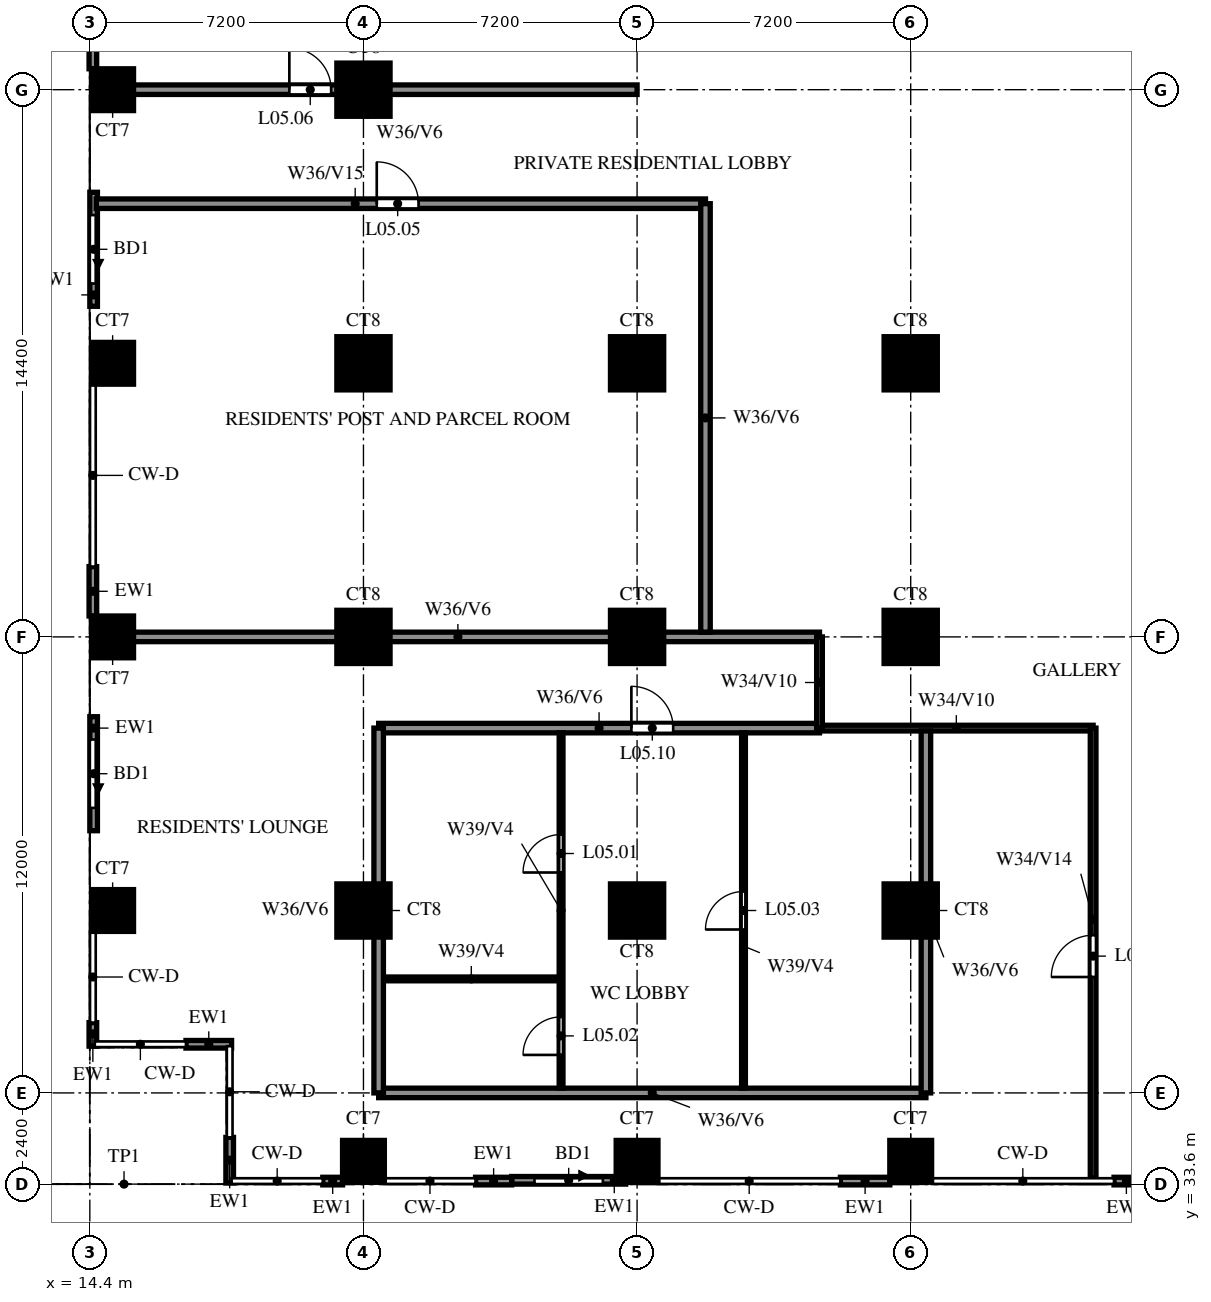
"""IFC4 building model, lengths in metres.
Left out: names, types, materials, properties, quantities, classifications, styles, units other than length and angle.
Written with IfcOpenShell. Run it as: python <this file> out.ifc"""

import sys

from ifc_helpers import new_model, si_unit, direction, frame, frame_2d, origin, origin_2d, place, context, subcontext, project, spatial, rectangle, extrude, source, transform, mapped, element, fill, save


model = new_model("IFC4")
c1 = context("Model", 3, precision=1e-05, world=origin(), true_north=direction((0.0, 1.0)))
c2 = subcontext(c1, "Body", "Model", "MODEL_VIEW")
j1 = project(units=[si_unit("LENGTHUNIT", "METRE"), si_unit("PLANEANGLEUNIT", "RADIAN")], contexts=[c1])
p1 = place(None, origin())
s1 = spatial("IfcSite", under=j1, at=p1, CompositionType="ELEMENT")
p2 = place(p1, origin())
s2 = spatial("IfcBuilding", under=s1, at=p2, CompositionType="ELEMENT")
p3 = place(p2, frame((0.0, 0.0, 27.0)))
s3 = spatial("IfcBuildingStorey", under=s2, at=p3, CompositionType="ELEMENT", Elevation=27.0)
m1 = source(origin(), c2, "Body", "SweptSolid", [
    extrude(rectangle(XDim=1.1, YDim=1.1, at=origin_2d()), origin(), (0.0, 0.0, 1.0), 3.18),
])
for number, where, z_axis, x_axis in (
    (1, (21.6, 34.2, 0.0), (0.0, 0.0, 1.0), (1.0, 0.0, 0.0)),
    (2, (28.8, 34.2, 0.0), (0.0, 0.0, 1.0), (1.0, 0.0, 0.0)),
    (3, (36.0, 34.2, 0.0), (0.0, 0.0, 1.0), (1.0, 0.0, 0.0)),
    (4, (15.0, 40.8, 0.0), (0.0, 0.0, 1.0), (1.0, 0.0, 0.0)),
):
    element("IfcColumn", number, at=place(p3, frame(where, z_axis=z_axis, x_axis=x_axis)), inside=s3, PredefinedType="COLUMN", context=c2, shape_type="MappedRepresentation", body=[
        mapped(m1, transform((0.0, 0.0, 0.0))),
    ])
m2 = source(origin(), c2, "Body", "SweptSolid", [
    extrude(rectangle(XDim=1.4, YDim=1.4, at=origin_2d()), origin(), (0.0, 0.0, 1.0), 3.18),
])
for number, where, z_axis, x_axis in (
    (5, (21.6, 40.8, 0.0), (0.0, 0.0, 1.0), (1.0, 0.0, 0.0)),
    (6, (28.8, 40.8, 0.0), (0.0, 0.0, 1.0), (1.0, 0.0, 0.0)),
    (7, (36.0, 40.8, 0.0), (0.0, 0.0, 1.0), (1.0, 0.0, 0.0)),
):
    element("IfcColumn", number, at=place(p3, frame(where, z_axis=z_axis, x_axis=x_axis)), inside=s3, PredefinedType="COLUMN", context=c2, shape_type="MappedRepresentation", body=[
        mapped(m2, transform((0.0, 0.0, 0.0))),
    ])
p4 = place(p3, frame((15.0, 48.0, 0.0), z_axis=(0.0, 0.0, 1.0), x_axis=(1.0, 0.0, 0.0)))
e8 = element("IfcColumn", 8, at=p4, inside=s3, PredefinedType="COLUMN", context=c2, shape_type="MappedRepresentation", body=[
    mapped(m1, transform((0.0, 0.0, 0.0))),
])
for number, where, z_axis, x_axis in (
    (9, (21.6, 48.0, 0.0), (0.0, 0.0, 1.0), (1.0, 0.0, 0.0)),
    (10, (28.8, 48.0, 0.0), (0.0, 0.0, 1.0), (1.0, 0.0, 0.0)),
    (11, (36.0, 48.0, 0.0), (0.0, 0.0, 1.0), (1.0, 0.0, 0.0)),
):
    element("IfcColumn", number, at=place(p3, frame(where, z_axis=z_axis, x_axis=x_axis)), inside=s3, PredefinedType="COLUMN", context=c2, shape_type="MappedRepresentation", body=[
        mapped(m2, transform((0.0, 0.0, 0.0))),
    ])
p5 = place(p3, frame((15.0, 55.2, 0.0), z_axis=(0.0, 0.0, 1.0), x_axis=(1.0, 0.0, 0.0)))
e12 = element("IfcColumn", 12, at=p5, inside=s3, PredefinedType="COLUMN", context=c2, shape_type="MappedRepresentation", body=[
    mapped(m1, transform((0.0, 0.0, 0.0))),
])
for number, where, z_axis, x_axis in (
    (13, (21.6, 55.2, 0.0), (0.0, 0.0, 1.0), (1.0, 0.0, 0.0)),
    (14, (28.8, 55.2, 0.0), (0.0, 0.0, 1.0), (1.0, 0.0, 0.0)),
    (15, (36.0, 55.2, 0.0), (0.0, 0.0, 1.0), (1.0, 0.0, 0.0)),
):
    element("IfcColumn", number, at=place(p3, frame(where, z_axis=z_axis, x_axis=x_axis)), inside=s3, PredefinedType="COLUMN", context=c2, shape_type="MappedRepresentation", body=[
        mapped(m2, transform((0.0, 0.0, 0.0))),
    ])
p6 = place(p3, frame((15.0, 62.4, 0.0), z_axis=(0.0, 0.0, 1.0), x_axis=(1.0, 0.0, 0.0)))
e16 = element("IfcColumn", 16, at=p6, inside=s3, PredefinedType="COLUMN", context=c2, shape_type="MappedRepresentation", body=[
    mapped(m1, transform((0.0, 0.0, 0.0))),
])
p7 = place(p3, frame((21.6, 62.4, 0.0), z_axis=(0.0, 0.0, 1.0), x_axis=(1.0, 0.0, 0.0)))
e17 = element("IfcColumn", 17, at=p7, inside=s3, PredefinedType="COLUMN", context=c2, shape_type="MappedRepresentation", body=[
    mapped(m2, transform((0.0, 0.0, 0.0))),
])
p8 = place(p3, frame((14.5, 59.7, 0.0), z_axis=(0.0, 0.0, 1.0), x_axis=(0.0, -1.0, 0.0)))
e18 = element("IfcWall", 18, at=p8, inside=s3, PredefinedType="SOLIDWALL", context=c2, shape_type="SweptSolid", body=[
    extrude(rectangle(XDim=3.0, YDim=0.2, at=frame_2d((1.5, 0.0))), origin(), (0.0, 0.0, 1.0), 3.18),
])
p9 = place(p8, frame((0.6, 0.0, 0.0)))
e19 = element("IfcOpeningElement", 19, at=p9, cuts=e18, PredefinedType="OPENING", context=c2, shape_type="SweptSolid", body=[
    extrude(rectangle(XDim=1.8, YDim=2.4, at=frame_2d((0.9, 1.2))), frame((0.0, 0.11, 0.0), z_axis=(0.0, -1.0, 0.0), x_axis=(1.0, 0.0, 0.0)), (0.0, 0.0, 1.0), 0.22),
])
p10 = place(p3, frame((14.5, 45.9, 0.0), z_axis=(0.0, 0.0, 1.0), x_axis=(0.0, -1.0, 0.0)))
e20 = element("IfcWall", 20, at=p10, inside=s3, PredefinedType="SOLIDWALL", context=c2, shape_type="SweptSolid", body=[
    extrude(rectangle(XDim=3.0, YDim=0.2, at=frame_2d((1.5, 0.0))), origin(), (0.0, 0.0, 1.0), 3.18),
])
p11 = place(p10, frame((0.6, 0.0, 0.0)))
e21 = element("IfcOpeningElement", 21, at=p11, cuts=e20, PredefinedType="OPENING", context=c2, shape_type="SweptSolid", body=[
    extrude(rectangle(XDim=1.8, YDim=2.4, at=frame_2d((0.9, 1.2))), frame((0.0, 0.11, 0.0), z_axis=(0.0, -1.0, 0.0), x_axis=(1.0, 0.0, 0.0)), (0.0, 0.0, 1.0), 0.22),
])
for number, where, z_axis, x_axis in (
    (22, (14.48, 64.25, 0.0), (0.0, 0.0, 1.0), (0.0, -1.0, 0.0)),
    (23, (14.48, 49.85, 0.0), (0.0, 0.0, 1.0), (0.0, -1.0, 0.0)),
):
    element("IfcWall", number, at=place(p3, frame(where, z_axis=z_axis, x_axis=x_axis)), inside=s3, PredefinedType="SOLIDWALL", context=c2, shape_type="SweptSolid", body=[
        extrude(rectangle(XDim=1.3, YDim=0.2, at=frame_2d((0.65, 0.0))), origin(), (0.0, 0.0, 1.0), 3.18),
    ])
p12 = place(p3, frame((14.48, 37.85, 0.0), z_axis=(0.0, 0.0, 1.0), x_axis=(0.0, -1.0, 0.0)))
e24 = element("IfcWall", 24, at=p12, inside=s3, PredefinedType="SOLIDWALL", context=c2, shape_type="SweptSolid", body=[
    extrude(rectangle(XDim=0.62, YDim=0.2, at=frame_2d((0.31, 0.0))), origin(), (0.0, 0.0, 1.0), 3.18),
])
p13 = place(p3, frame((16.93, 37.28, 0.0), z_axis=(0.0, 0.0, 1.0), x_axis=(1.0, 0.0, 0.0)))
e25 = element("IfcWall", 25, at=p13, inside=s3, PredefinedType="SOLIDWALL", context=c2, shape_type="SweptSolid", body=[
    extrude(rectangle(XDim=1.2, YDim=0.2, at=frame_2d((0.6, 0.0))), origin(), (0.0, 0.0, 1.0), 3.18),
])
p14 = place(p3, frame((18.08, 34.83, 0.0), z_axis=(0.0, 0.0, 1.0), x_axis=(0.0, -1.0, 0.0)))
e26 = element("IfcWall", 26, at=p14, inside=s3, PredefinedType="SOLIDWALL", context=c2, shape_type="SweptSolid", body=[
    extrude(rectangle(XDim=1.2, YDim=0.2, at=frame_2d((0.6, 0.0))), origin(), (0.0, 0.0, 1.0), 3.18),
])
p15 = place(p3, frame((25.5, 33.7, 0.0), z_axis=(0.0, 0.0, 1.0), x_axis=(1.0, 0.0, 0.0)))
e27 = element("IfcWall", 27, at=p15, inside=s3, PredefinedType="SOLIDWALL", context=c2, shape_type="SweptSolid", body=[
    extrude(rectangle(XDim=3.0, YDim=0.2, at=frame_2d((1.5, 0.0))), origin(), (0.0, 0.0, 1.0), 3.18),
])
p16 = place(p15, frame((0.6, 0.0, 0.0)))
e28 = element("IfcOpeningElement", 28, at=p16, cuts=e27, PredefinedType="OPENING", context=c2, shape_type="SweptSolid", body=[
    extrude(rectangle(XDim=1.8, YDim=2.4, at=frame_2d((0.9, 1.2))), frame((0.0, 0.11, 0.0), z_axis=(0.0, -1.0, 0.0), x_axis=(1.0, 0.0, 0.0)), (0.0, 0.0, 1.0), 0.22),
])
p17 = place(p3, frame((20.53, 33.68, 0.0), z_axis=(0.0, 0.0, 1.0), x_axis=(1.0, 0.0, 0.0)))
e29 = element("IfcWall", 29, at=p17, inside=s3, PredefinedType="SOLIDWALL", context=c2, shape_type="SweptSolid", body=[
    extrude(rectangle(XDim=0.52, YDim=0.2, at=frame_2d((0.26, 0.0))), origin(), (0.0, 0.0, 1.0), 3.18),
])
p18 = place(p3, frame((24.55, 33.68, 0.0), z_axis=(0.0, 0.0, 1.0), x_axis=(1.0, 0.0, 0.0)))
e30 = element("IfcWall", 30, at=p18, inside=s3, PredefinedType="SOLIDWALL", context=c2, shape_type="SweptSolid", body=[
    extrude(rectangle(XDim=0.95, YDim=0.2, at=frame_2d((0.475, 0.0))), origin(), (0.0, 0.0, 1.0), 3.18),
])
p19 = place(p3, frame((34.15, 33.68, 0.0), z_axis=(0.0, 0.0, 1.0), x_axis=(1.0, 0.0, 0.0)))
e31 = element("IfcWall", 31, at=p19, inside=s3, PredefinedType="SOLIDWALL", context=c2, shape_type="SweptSolid", body=[
    extrude(rectangle(XDim=1.3, YDim=0.2, at=frame_2d((0.65, 0.0))), origin(), (0.0, 0.0, 1.0), 3.18),
])
p20 = place(p3, frame((41.35, 33.68, 0.0), z_axis=(0.0, 0.0, 1.0), x_axis=(1.0, 0.0, 0.0)))
e32 = element("IfcWall", 32, at=p20, inside=s3, PredefinedType="SOLIDWALL", context=c2, shape_type="SweptSolid", body=[
    extrude(rectangle(XDim=0.65, YDim=0.2, at=frame_2d((0.325, 0.0))), origin(), (0.0, 0.0, 1.0), 3.18),
])
p21 = place(p3, frame((22.0, 36.0, 0.0), z_axis=(0.0, 0.0, 1.0), x_axis=(1.0, 0.0, 0.0)))
e33 = element("IfcWall", 33, at=p21, inside=s3, PredefinedType="SOLIDWALL", context=c2, shape_type="SweptSolid", body=[
    extrude(rectangle(XDim=14.4, YDim=0.25, at=frame_2d((7.2, 0.0))), origin(), (0.0, 0.0, 1.0), 3.18),
])
p22 = place(p3, frame((22.125, 39.0, 0.0), z_axis=(0.0, 0.0, 1.0), x_axis=(1.0, 0.0, 0.0)))
e34 = element("IfcWall", 34, at=p22, inside=s3, PredefinedType="PARTITIONING", context=c2, shape_type="SweptSolid", body=[
    extrude(rectangle(XDim=4.625, YDim=0.1, at=frame_2d((2.312, 0.0))), origin(), (0.0, 0.0, 1.0), 3.18),
])
p23 = place(p3, frame((33.6, 45.6, 0.0), z_axis=(0.0, 0.0, 1.0), x_axis=(1.0, 0.0, 0.0)))
e35 = element("IfcWall", 35, at=p23, inside=s3, PredefinedType="PARTITIONING", context=c2, shape_type="SweptSolid", body=[
    extrude(rectangle(XDim=7.2, YDim=0.15, at=frame_2d((3.6, 0.0))), origin(), (0.0, 0.0, 1.0), 3.18),
])
p24 = place(p3, frame((22.0, 45.6, 0.0), z_axis=(0.0, 0.0, 1.0), x_axis=(1.0, 0.0, 0.0)))
e36 = element("IfcWall", 36, at=p24, inside=s3, PredefinedType="SOLIDWALL", context=c2, shape_type="SweptSolid", body=[
    extrude(rectangle(XDim=11.6, YDim=0.25, at=frame_2d((5.8, 0.0))), origin(), (0.0, 0.0, 1.0), 3.18),
])
p25 = place(p24, frame((6.65, 0.0, 0.0)))
e37 = element("IfcOpeningElement", 37, at=p25, cuts=e36, PredefinedType="OPENING", context=c2, shape_type="SweptSolid", body=[
    extrude(rectangle(XDim=1.1, YDim=2.1, at=frame_2d((0.55, 1.05))), frame((0.0, 0.135, 0.0), z_axis=(0.0, -1.0, 0.0), x_axis=(1.0, 0.0, 0.0)), (0.0, 0.0, 1.0), 0.27),
])
p26 = place(p3, frame((14.57, 48.0, 0.0), z_axis=(0.0, 0.0, 1.0), x_axis=(1.0, 0.0, 0.0)))
e38 = element("IfcWall", 38, at=p26, inside=s3, PredefinedType="SOLIDWALL", context=c2, shape_type="SweptSolid", body=[
    extrude(rectangle(XDim=19.03, YDim=0.25, at=frame_2d((9.515, 0.0))), origin(), (0.0, 0.0, 1.0), 3.18),
])
p27 = place(p3, frame((14.57, 59.4, 0.0), z_axis=(0.0, 0.0, 1.0), x_axis=(1.0, 0.0, 0.0)))
e39 = element("IfcWall", 39, at=p27, inside=s3, PredefinedType="SOLIDWALL", context=c2, shape_type="SweptSolid", body=[
    extrude(rectangle(XDim=16.03, YDim=0.25, at=frame_2d((8.015, 0.0))), origin(), (0.0, 0.0, 1.0), 2.28),
])
p28 = place(p27, frame((7.38, 0.0, 0.0)))
e40 = element("IfcOpeningElement", 40, at=p28, cuts=e39, PredefinedType="OPENING", context=c2, shape_type="SweptSolid", body=[
    extrude(rectangle(XDim=1.1, YDim=2.1, at=frame_2d((0.55, 1.05))), frame((0.0, 0.135, 0.0), z_axis=(0.0, -1.0, 0.0), x_axis=(1.0, 0.0, 0.0)), (0.0, 0.0, 1.0), 0.27),
])
p29 = place(p3, frame((14.57, 62.4, 0.0), z_axis=(0.0, 0.0, 1.0), x_axis=(1.0, 0.0, 0.0)))
e41 = element("IfcWall", 41, at=p29, inside=s3, PredefinedType="SOLIDWALL", context=c2, shape_type="SweptSolid", body=[
    extrude(rectangle(XDim=14.23, YDim=0.25, at=frame_2d((7.115, 0.0))), origin(), (0.0, 0.0, 1.0), 3.18),
])
p30 = place(p29, frame((5.08, 0.0, 0.0)))
e42 = element("IfcOpeningElement", 42, at=p30, cuts=e41, PredefinedType="OPENING", context=c2, shape_type="SweptSolid", body=[
    extrude(rectangle(XDim=1.1, YDim=2.1, at=frame_2d((0.55, 1.05))), frame((0.0, 0.135, 0.0), z_axis=(0.0, -1.0, 0.0), x_axis=(1.0, 0.0, 0.0)), (0.0, 0.0, 1.0), 0.27),
])
p31 = place(p3, frame((22.0, 36.0, 0.0), z_axis=(0.0, 0.0, 1.0), x_axis=(0.0, 1.0, 0.0)))
e43 = element("IfcWall", 43, at=p31, inside=s3, PredefinedType="SOLIDWALL", context=c2, shape_type="SweptSolid", body=[
    extrude(rectangle(XDim=9.6, YDim=0.25, at=frame_2d((4.8, 0.0))), origin(), (0.0, 0.0, 1.0), 3.18),
])
p32 = place(p3, frame((26.8, 36.125, 0.0), z_axis=(0.0, 0.0, 1.0), x_axis=(0.0, 1.0, 0.0)))
e44 = element("IfcWall", 44, at=p32, inside=s3, PredefinedType="PARTITIONING", context=c2, shape_type="SweptSolid", body=[
    extrude(rectangle(XDim=9.35, YDim=0.1, at=frame_2d((4.675, 0.0))), origin(), (0.0, 0.0, 1.0), 3.18),
])
p33 = place(p32, frame((5.675, 0.0, 0.0)))
e45 = element("IfcOpeningElement", 45, at=p33, cuts=e44, PredefinedType="OPENING", context=c2, shape_type="SweptSolid", body=[
    extrude(rectangle(XDim=1.0, YDim=2.1, at=frame_2d((0.5, 1.05))), frame((0.0, 0.06, 0.0), z_axis=(0.0, -1.0, 0.0), x_axis=(1.0, 0.0, 0.0)), (0.0, 0.0, 1.0), 0.12),
])
p34 = place(p32, frame((0.875, 0.0, 0.0)))
e46 = element("IfcOpeningElement", 46, at=p34, cuts=e44, PredefinedType="OPENING", context=c2, shape_type="SweptSolid", body=[
    extrude(rectangle(XDim=1.0, YDim=2.1, at=frame_2d((0.5, 1.05))), frame((0.0, 0.06, 0.0), z_axis=(0.0, -1.0, 0.0), x_axis=(1.0, 0.0, 0.0)), (0.0, 0.0, 1.0), 0.12),
])
p35 = place(p3, frame((30.6, 48.125, 0.0), z_axis=(0.0, 0.0, 1.0), x_axis=(0.0, 1.0, 0.0)))
e47 = element("IfcWall", 47, at=p35, inside=s3, PredefinedType="SOLIDWALL", context=c2, shape_type="SweptSolid", body=[
    extrude(rectangle(XDim=11.275, YDim=0.25, at=frame_2d((5.637, 0.0))), origin(), (0.0, 0.0, 1.0), 3.18),
])
p36 = place(p3, frame((31.6, 36.125, 0.0), z_axis=(0.0, 0.0, 1.0), x_axis=(0.0, 1.0, 0.0)))
e48 = element("IfcWall", 48, at=p36, inside=s3, PredefinedType="PARTITIONING", context=c2, shape_type="SweptSolid", body=[
    extrude(rectangle(XDim=9.35, YDim=0.1, at=frame_2d((4.675, 0.0))), origin(), (0.0, 0.0, 1.0), 3.18),
])
p37 = place(p36, frame((4.175, 0.0, 0.0)))
e49 = element("IfcOpeningElement", 49, at=p37, cuts=e48, PredefinedType="OPENING", context=c2, shape_type="SweptSolid", body=[
    extrude(rectangle(XDim=1.0, YDim=2.1, at=frame_2d((0.5, 1.05))), frame((0.0, 0.06, 0.0), z_axis=(0.0, -1.0, 0.0), x_axis=(1.0, 0.0, 0.0)), (0.0, 0.0, 1.0), 0.12),
])
p38 = place(p3, frame((33.6, 45.6, 0.0), z_axis=(0.0, 0.0, 1.0), x_axis=(0.0, 1.0, 0.0)))
e50 = element("IfcWall", 50, at=p38, inside=s3, PredefinedType="PARTITIONING", context=c2, shape_type="SweptSolid", body=[
    extrude(rectangle(XDim=2.4, YDim=0.15, at=frame_2d((1.2, 0.0))), origin(), (0.0, 0.0, 1.0), 3.18),
])
p39 = place(p3, frame((36.4, 36.0, 0.0), z_axis=(0.0, 0.0, 1.0), x_axis=(0.0, 1.0, 0.0)))
e51 = element("IfcWall", 51, at=p39, inside=s3, PredefinedType="SOLIDWALL", context=c2, shape_type="SweptSolid", body=[
    extrude(rectangle(XDim=9.525, YDim=0.25, at=frame_2d((4.762, 0.0))), origin(), (0.0, 0.0, 1.0), 3.18),
])
p40 = place(p3, frame((40.8, 33.77, 0.0), z_axis=(0.0, 0.0, 1.0), x_axis=(0.0, 1.0, 0.0)))
e52 = element("IfcWall", 52, at=p40, inside=s3, PredefinedType="PARTITIONING", context=c2, shape_type="SweptSolid", body=[
    extrude(rectangle(XDim=11.83, YDim=0.15, at=frame_2d((5.915, 0.0))), origin(), (0.0, 0.0, 1.0), 2.28),
])
p41 = place(p40, frame((5.28, 0.0, 0.0)))
e53 = element("IfcOpeningElement", 53, at=p41, cuts=e52, PredefinedType="OPENING", context=c2, shape_type="SweptSolid", body=[
    extrude(rectangle(XDim=1.1, YDim=2.1, at=frame_2d((0.55, 1.05))), frame((0.0, 0.085, 0.0), z_axis=(0.0, -1.0, 0.0), x_axis=(1.0, 0.0, 0.0)), (0.0, 0.0, 1.0), 0.17),
])
p42 = place(p9, origin())
e54 = element("IfcDoor", 54, at=p42, inside=s3, OperationType="DOUBLE_DOOR_SLIDING", PredefinedType="DOOR", context=c2, shape_type="SweptSolid", body=[
    extrude(rectangle(XDim=1.8, YDim=2.4, at=frame_2d((0.9, 1.2))), frame((0.0, 0.025, 0.0), z_axis=(0.0, -1.0, 0.0), x_axis=(1.0, 0.0, 0.0)), (0.0, 0.0, 1.0), 0.05),
])
fill(e19, e54)
p43 = place(p11, origin())
e55 = element("IfcDoor", 55, at=p43, inside=s3, OperationType="DOUBLE_DOOR_SLIDING", PredefinedType="DOOR", context=c2, shape_type="SweptSolid", body=[
    extrude(rectangle(XDim=1.8, YDim=2.4, at=frame_2d((0.9, 1.2))), frame((0.0, 0.025, 0.0), z_axis=(0.0, -1.0, 0.0), x_axis=(1.0, 0.0, 0.0)), (0.0, 0.0, 1.0), 0.05),
])
fill(e21, e55)
p44 = place(p16, origin())
e56 = element("IfcDoor", 56, at=p44, inside=s3, OperationType="DOUBLE_DOOR_SLIDING", PredefinedType="DOOR", context=c2, shape_type="SweptSolid", body=[
    extrude(rectangle(XDim=1.8, YDim=2.4, at=frame_2d((0.9, 1.2))), frame((0.0, 0.025, 0.0), z_axis=(0.0, -1.0, 0.0), x_axis=(1.0, 0.0, 0.0)), (0.0, 0.0, 1.0), 0.05),
])
fill(e28, e56)
p45 = place(p33, origin())
e57 = element("IfcDoor", 57, at=p45, inside=s3, OperationType="SINGLE_SWING_RIGHT", PredefinedType="DOOR", context=c2, shape_type="SweptSolid", body=[
    extrude(rectangle(XDim=1.0, YDim=2.1, at=frame_2d((0.5, 1.05))), frame((0.0, 0.025, 0.0), z_axis=(0.0, -1.0, 0.0), x_axis=(1.0, 0.0, 0.0)), (0.0, 0.0, 1.0), 0.05),
])
fill(e45, e57)
p46 = place(p34, origin())
e58 = element("IfcDoor", 58, at=p46, inside=s3, OperationType="SINGLE_SWING_LEFT", PredefinedType="DOOR", context=c2, shape_type="SweptSolid", body=[
    extrude(rectangle(XDim=1.0, YDim=2.1, at=frame_2d((0.5, 1.05))), frame((0.0, 0.025, 0.0), z_axis=(0.0, -1.0, 0.0), x_axis=(1.0, 0.0, 0.0)), (0.0, 0.0, 1.0), 0.05),
])
fill(e46, e58)
p47 = place(p37, origin())
e59 = element("IfcDoor", 59, at=p47, inside=s3, OperationType="SINGLE_SWING_LEFT", PredefinedType="DOOR", context=c2, shape_type="SweptSolid", body=[
    extrude(rectangle(XDim=1.0, YDim=2.1, at=frame_2d((0.5, 1.05))), frame((0.0, 0.025, 0.0), z_axis=(0.0, -1.0, 0.0), x_axis=(1.0, 0.0, 0.0)), (0.0, 0.0, 1.0), 0.05),
])
fill(e49, e59)
p48 = place(p41, origin())
e60 = element("IfcDoor", 60, at=p48, inside=s3, OperationType="SINGLE_SWING_LEFT", PredefinedType="DOOR", context=c2, shape_type="SweptSolid", body=[
    extrude(rectangle(XDim=1.1, YDim=2.1, at=frame_2d((0.55, 1.05))), frame((0.0, 0.025, 0.0), z_axis=(0.0, -1.0, 0.0), x_axis=(1.0, 0.0, 0.0)), (0.0, 0.0, 1.0), 0.05),
])
fill(e53, e60)
p49 = place(p28, origin())
e61 = element("IfcDoor", 61, at=p49, inside=s3, OperationType="SINGLE_SWING_LEFT", PredefinedType="DOOR", context=c2, shape_type="SweptSolid", body=[
    extrude(rectangle(XDim=1.1, YDim=2.1, at=frame_2d((0.55, 1.05))), frame((0.0, 0.025, 0.0), z_axis=(0.0, -1.0, 0.0), x_axis=(1.0, 0.0, 0.0)), (0.0, 0.0, 1.0), 0.05),
])
fill(e40, e61)
p50 = place(p30, origin())
e62 = element("IfcDoor", 62, at=p50, inside=s3, OperationType="SINGLE_SWING_LEFT", PredefinedType="DOOR", context=c2, shape_type="SweptSolid", body=[
    extrude(rectangle(XDim=1.1, YDim=2.1, at=frame_2d((0.55, 1.05))), frame((0.0, 0.025, 0.0), z_axis=(0.0, -1.0, 0.0), x_axis=(1.0, 0.0, 0.0)), (0.0, 0.0, 1.0), 0.05),
])
fill(e42, e62)
p51 = place(p25, origin())
e63 = element("IfcDoor", 63, at=p51, inside=s3, OperationType="SINGLE_SWING_RIGHT", PredefinedType="DOOR", context=c2, shape_type="SweptSolid", body=[
    extrude(rectangle(XDim=1.1, YDim=2.1, at=frame_2d((0.55, 1.05))), frame((0.0, 0.025, 0.0), z_axis=(0.0, -1.0, 0.0), x_axis=(1.0, 0.0, 0.0)), (0.0, 0.0, 1.0), 0.05),
])
fill(e37, e63)
save(model, sys.argv[1])
